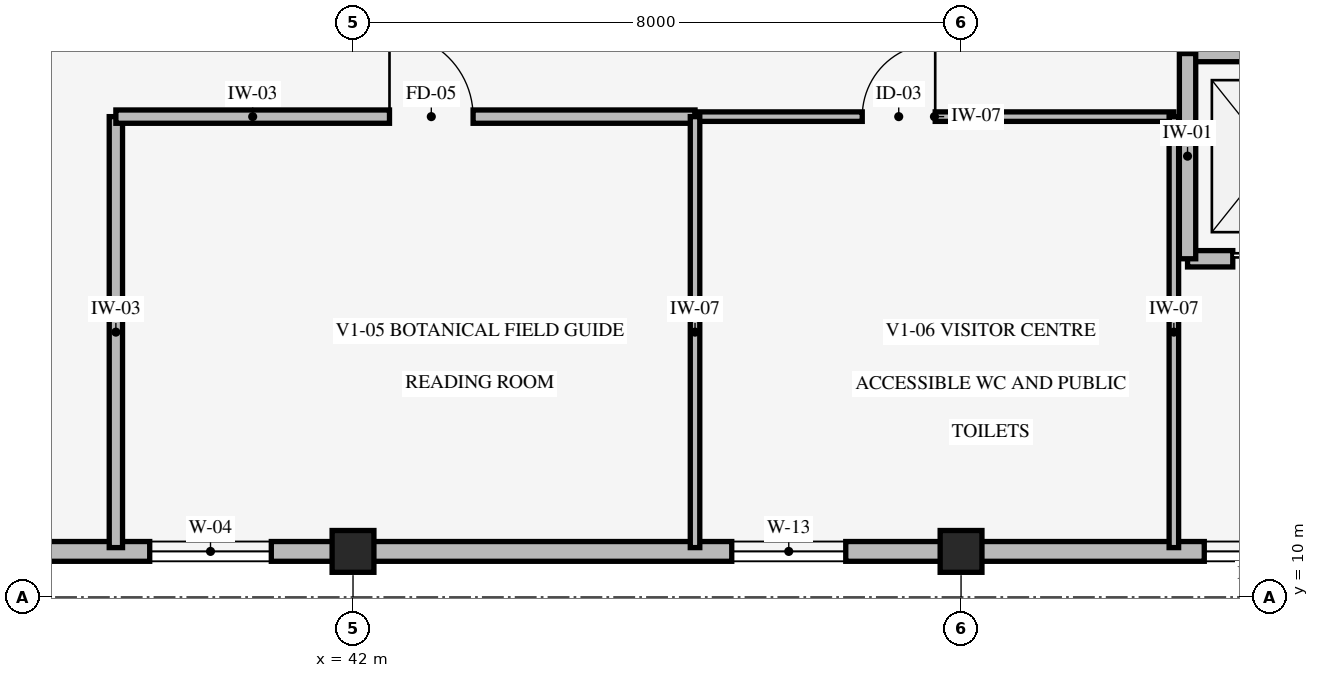
"""IFC4 building model, lengths in metres.
Left out: names, types, materials, properties, quantities, classifications, styles, units other than length and angle.
Written with IfcOpenShell. Run it as: python <this file> out.ifc"""

import sys

from ifc_helpers import new_model, si_unit, direction, frame, frame_2d, origin, origin_2d, place, context, subcontext, project, spatial, rectangle, extrude, element, fill, save


model = new_model("IFC4")
c1 = context("Model", 3, precision=1e-05, world=origin(), true_north=direction((0.0, 1.0)))
c2 = subcontext(c1, "Body", "Model", "MODEL_VIEW")
j1 = project(units=[si_unit("LENGTHUNIT", "METRE"), si_unit("PLANEANGLEUNIT", "RADIAN")], contexts=[c1])
p1 = place(None, origin())
s1 = spatial("IfcSite", under=j1, at=p1, CompositionType="ELEMENT")
p2 = place(p1, origin())
s2 = spatial("IfcBuilding", under=s1, at=p2, CompositionType="ELEMENT")
p3 = place(p2, origin())
s3 = spatial("IfcBuildingStorey", under=s2, at=p3, CompositionType="ELEMENT", Elevation=0.0)
for number, where, z_axis, x_axis in (
    (1, (42.0, 10.6, -0.28), (0.0, 0.0, 1.0), (1.0, 0.0, 0.0)),
    (2, (50.0, 10.6, -0.28), (0.0, 0.0, 1.0), (1.0, 0.0, 0.0)),
):
    element("IfcColumn", number, at=place(p3, frame(where, z_axis=z_axis, x_axis=x_axis)), inside=s3, PredefinedType="COLUMN", context=c2, shape_type="SweptSolid", body=[
        extrude(rectangle(XDim=0.55, YDim=0.55, at=origin_2d()), origin(), (0.0, 0.0, 1.0), 5.68),
    ])
p4 = place(p3, frame((58.0, 10.6, 0.0), z_axis=(0.0, 0.0, 1.0), x_axis=(-1.0, 0.0, 0.0)))
e3 = element("IfcWall", 3, at=p4, inside=s3, PredefinedType="STANDARD", context=c2, shape_type="SweptSolid", body=[
    extrude(rectangle(XDim=8.0, YDim=0.26, at=frame_2d((4.0, 0.0))), origin(), (0.0, 0.0, 1.0), 4.18),
])
p5 = place(p4, frame((3.2, 0.0, 0.85)))
e4 = element("IfcOpeningElement", 4, at=p5, cuts=e3, PredefinedType="OPENING", context=c2, shape_type="SweptSolid", body=[
    extrude(rectangle(XDim=1.6, YDim=1.2, at=frame_2d((0.8, 0.6))), frame((0.0, 0.14, 0.0), z_axis=(0.0, -1.0, 0.0), x_axis=(1.0, 0.0, 0.0)), (0.0, 0.0, 1.0), 0.28),
])
p6 = place(p3, frame((50.0, 10.6, 0.0), z_axis=(0.0, 0.0, 1.0), x_axis=(-1.0, 0.0, 0.0)))
e5 = element("IfcWall", 5, at=p6, inside=s3, PredefinedType="STANDARD", context=c2, shape_type="SweptSolid", body=[
    extrude(rectangle(XDim=8.0, YDim=0.26, at=frame_2d((4.0, 0.0))), origin(), (0.0, 0.0, 1.0), 4.18),
])
p7 = place(p6, frame((1.517, 0.0, 0.85)))
e6 = element("IfcOpeningElement", 6, at=p7, cuts=e5, PredefinedType="OPENING", context=c2, shape_type="SweptSolid", body=[
    extrude(rectangle(XDim=1.5, YDim=2.1, at=frame_2d((0.75, 1.05))), frame((0.0, 0.14, 0.0), z_axis=(0.0, -1.0, 0.0), x_axis=(1.0, 0.0, 0.0)), (0.0, 0.0, 1.0), 0.28),
])
p8 = place(p3, frame((42.0, 10.6, 0.0), z_axis=(0.0, 0.0, 1.0), x_axis=(-1.0, 0.0, 0.0)))
e7 = element("IfcWall", 7, at=p8, inside=s3, PredefinedType="STANDARD", context=c2, shape_type="SweptSolid", body=[
    extrude(rectangle(XDim=8.0, YDim=0.26, at=frame_2d((4.0, 0.0))), origin(), (0.0, 0.0, 1.0), 4.18),
])
p9 = place(p8, frame((1.075, 0.0, 0.85)))
e8 = element("IfcOpeningElement", 8, at=p9, cuts=e7, PredefinedType="OPENING", context=c2, shape_type="SweptSolid", body=[
    extrude(rectangle(XDim=1.6, YDim=1.2, at=frame_2d((0.8, 0.6))), frame((0.0, 0.14, 0.0), z_axis=(0.0, -1.0, 0.0), x_axis=(1.0, 0.0, 0.0)), (0.0, 0.0, 1.0), 0.28),
])
p10 = place(p3, frame((52.98, 14.45, 0.0), z_axis=(0.0, 0.0, 1.0), x_axis=(1.0, 0.0, 0.0)))
e9 = element("IfcWall", 9, at=p10, inside=s3, PredefinedType="STANDARD", context=c2, shape_type="SweptSolid", body=[
    extrude(rectangle(XDim=2.24, YDim=0.215, at=frame_2d((1.12, 0.0))), origin(), (0.0, 0.0, 1.0), 5.1),
])
p11 = place(p10, frame((0.595, 0.0, 0.0)))
e10 = element("IfcOpeningElement", 10, at=p11, cuts=e9, PredefinedType="OPENING", context=c2, shape_type="SweptSolid", body=[
    extrude(rectangle(XDim=1.05, YDim=2.2, at=frame_2d((0.525, 1.1))), frame((0.0, 0.118, 0.0), z_axis=(0.0, -1.0, 0.0), x_axis=(1.0, 0.0, 0.0)), (0.0, 0.0, 1.0), 0.235),
])
p12 = place(p3, frame((55.22, 17.15, 0.0), z_axis=(0.0, 0.0, 1.0), x_axis=(-1.0, 0.0, 0.0)))
e11 = element("IfcWall", 11, at=p12, inside=s3, PredefinedType="STANDARD", context=c2, shape_type="SweptSolid", body=[
    extrude(rectangle(XDim=2.24, YDim=0.215, at=frame_2d((1.12, 0.0))), origin(), (0.0, 0.0, 1.0), 5.1),
])
p13 = place(p3, frame((52.98, 17.15, 0.0), z_axis=(0.0, 0.0, 1.0), x_axis=(0.0, -1.0, 0.0)))
e12 = element("IfcWall", 12, at=p13, inside=s3, PredefinedType="STANDARD", context=c2, shape_type="SweptSolid", body=[
    extrude(rectangle(XDim=2.7, YDim=0.215, at=frame_2d((1.35, 0.0))), origin(), (0.0, 0.0, 1.0), 5.1),
])
p14 = place(p3, frame((38.88, 10.65, 0.0), z_axis=(0.0, 0.0, 1.0), x_axis=(0.0, 1.0, 0.0)))
e13 = element("IfcWall", 13, at=p14, inside=s3, PredefinedType="STANDARD", context=c2, shape_type="SweptSolid", body=[
    extrude(rectangle(XDim=5.67, YDim=0.175, at=frame_2d((2.835, 0.0))), origin(), (0.0, 0.0, 1.0), 5.1),
])
p15 = place(p3, frame((38.88, 16.32, 0.0), z_axis=(0.0, 0.0, 1.0), x_axis=(1.0, 0.0, 0.0)))
e14 = element("IfcWall", 14, at=p15, inside=s3, PredefinedType="STANDARD", context=c2, shape_type="SweptSolid", body=[
    extrude(rectangle(XDim=7.62, YDim=0.175, at=frame_2d((3.81, 0.0))), origin(), (0.0, 0.0, 1.0), 5.1),
])
p16 = place(p15, frame((3.6, 0.0, 0.0)))
e15 = element("IfcOpeningElement", 15, at=p16, cuts=e14, PredefinedType="OPENING", context=c2, shape_type="SweptSolid", body=[
    extrude(rectangle(XDim=1.1, YDim=2.1, at=frame_2d((0.55, 1.05))), frame((0.0, 0.098, 0.0), z_axis=(0.0, -1.0, 0.0), x_axis=(1.0, 0.0, 0.0)), (0.0, 0.0, 1.0), 0.195),
])
p17 = place(p3, frame((46.5, 16.32, 0.0), z_axis=(0.0, 0.0, 1.0), x_axis=(1.0, 0.0, 0.0)))
e16 = element("IfcWall", 16, at=p17, inside=s3, PredefinedType="STANDARD", context=c2, shape_type="SweptSolid", body=[
    extrude(rectangle(XDim=6.3, YDim=0.125, at=frame_2d((3.15, 0.0))), origin(), (0.0, 0.0, 1.0), 5.1),
])
p18 = place(p17, frame((2.2, 0.0, 0.0)))
e17 = element("IfcOpeningElement", 17, at=p18, cuts=e16, PredefinedType="OPENING", context=c2, shape_type="SweptSolid", body=[
    extrude(rectangle(XDim=0.96, YDim=2.08, at=frame_2d((0.48, 1.04))), frame((0.0, 0.073, 0.0), z_axis=(0.0, -1.0, 0.0), x_axis=(1.0, 0.0, 0.0)), (0.0, 0.0, 1.0), 0.145),
])
p19 = place(p3, frame((46.5, 10.65, 0.0), z_axis=(0.0, 0.0, 1.0), x_axis=(0.0, 1.0, 0.0)))
e18 = element("IfcWall", 18, at=p19, inside=s3, PredefinedType="STANDARD", context=c2, shape_type="SweptSolid", body=[
    extrude(rectangle(XDim=5.67, YDim=0.125, at=frame_2d((2.835, 0.0))), origin(), (0.0, 0.0, 1.0), 4.74),
])
p20 = place(p3, frame((52.8, 10.65, 0.0), z_axis=(0.0, 0.0, 1.0), x_axis=(0.0, 1.0, 0.0)))
e19 = element("IfcWall", 19, at=p20, inside=s3, PredefinedType="STANDARD", context=c2, shape_type="SweptSolid", body=[
    extrude(rectangle(XDim=5.67, YDim=0.125, at=frame_2d((2.835, 0.0))), origin(), (0.0, 0.0, 1.0), 5.1),
])
p21 = place(p5, origin())
e20 = element("IfcWindow", 20, at=p21, inside=s3, PartitioningType="SINGLE_PANEL", PredefinedType="WINDOW", context=c2, shape_type="SweptSolid", body=[
    extrude(rectangle(XDim=1.6, YDim=1.2, at=frame_2d((0.8, 0.6))), frame((0.0, 0.03, 0.0), z_axis=(0.0, -1.0, 0.0), x_axis=(1.0, 0.0, 0.0)), (0.0, 0.0, 1.0), 0.06),
])
fill(e4, e20)
p22 = place(p7, origin())
e21 = element("IfcWindow", 21, at=p22, inside=s3, PartitioningType="SINGLE_PANEL", PredefinedType="WINDOW", context=c2, shape_type="SweptSolid", body=[
    extrude(rectangle(XDim=1.5, YDim=2.1, at=frame_2d((0.75, 1.05))), frame((0.0, 0.03, 0.0), z_axis=(0.0, -1.0, 0.0), x_axis=(1.0, 0.0, 0.0)), (0.0, 0.0, 1.0), 0.06),
])
fill(e6, e21)
p23 = place(p9, origin())
e22 = element("IfcWindow", 22, at=p23, inside=s3, PartitioningType="SINGLE_PANEL", PredefinedType="WINDOW", context=c2, shape_type="SweptSolid", body=[
    extrude(rectangle(XDim=1.6, YDim=1.2, at=frame_2d((0.8, 0.6))), frame((0.0, 0.03, 0.0), z_axis=(0.0, -1.0, 0.0), x_axis=(1.0, 0.0, 0.0)), (0.0, 0.0, 1.0), 0.06),
])
fill(e8, e22)
p24 = place(p11, origin())
e23 = element("IfcDoor", 23, at=p24, inside=s3, OperationType="SLIDING_TO_RIGHT", PredefinedType="DOOR", context=c2, shape_type="SweptSolid", body=[
    extrude(rectangle(XDim=1.05, YDim=2.2, at=frame_2d((0.525, 1.1))), frame((0.0, 0.025, 0.0), z_axis=(0.0, -1.0, 0.0), x_axis=(1.0, 0.0, 0.0)), (0.0, 0.0, 1.0), 0.05),
])
fill(e10, e23)
p25 = place(p16, origin())
e24 = element("IfcDoor", 24, at=p25, inside=s3, OperationType="SINGLE_SWING_LEFT", PredefinedType="DOOR", context=c2, shape_type="SweptSolid", body=[
    extrude(rectangle(XDim=1.1, YDim=2.1, at=frame_2d((0.55, 1.05))), frame((0.0, 0.025, 0.0), z_axis=(0.0, -1.0, 0.0), x_axis=(1.0, 0.0, 0.0)), (0.0, 0.0, 1.0), 0.05),
])
fill(e15, e24)
p26 = place(p18, origin())
e25 = element("IfcDoor", 25, at=p26, inside=s3, OperationType="SINGLE_SWING_RIGHT", PredefinedType="DOOR", context=c2, shape_type="SweptSolid", body=[
    extrude(rectangle(XDim=0.96, YDim=2.08, at=frame_2d((0.48, 1.04))), frame((0.0, 0.025, 0.0), z_axis=(0.0, -1.0, 0.0), x_axis=(1.0, 0.0, 0.0)), (0.0, 0.0, 1.0), 0.05),
])
fill(e17, e25)
save(model, sys.argv[1])
